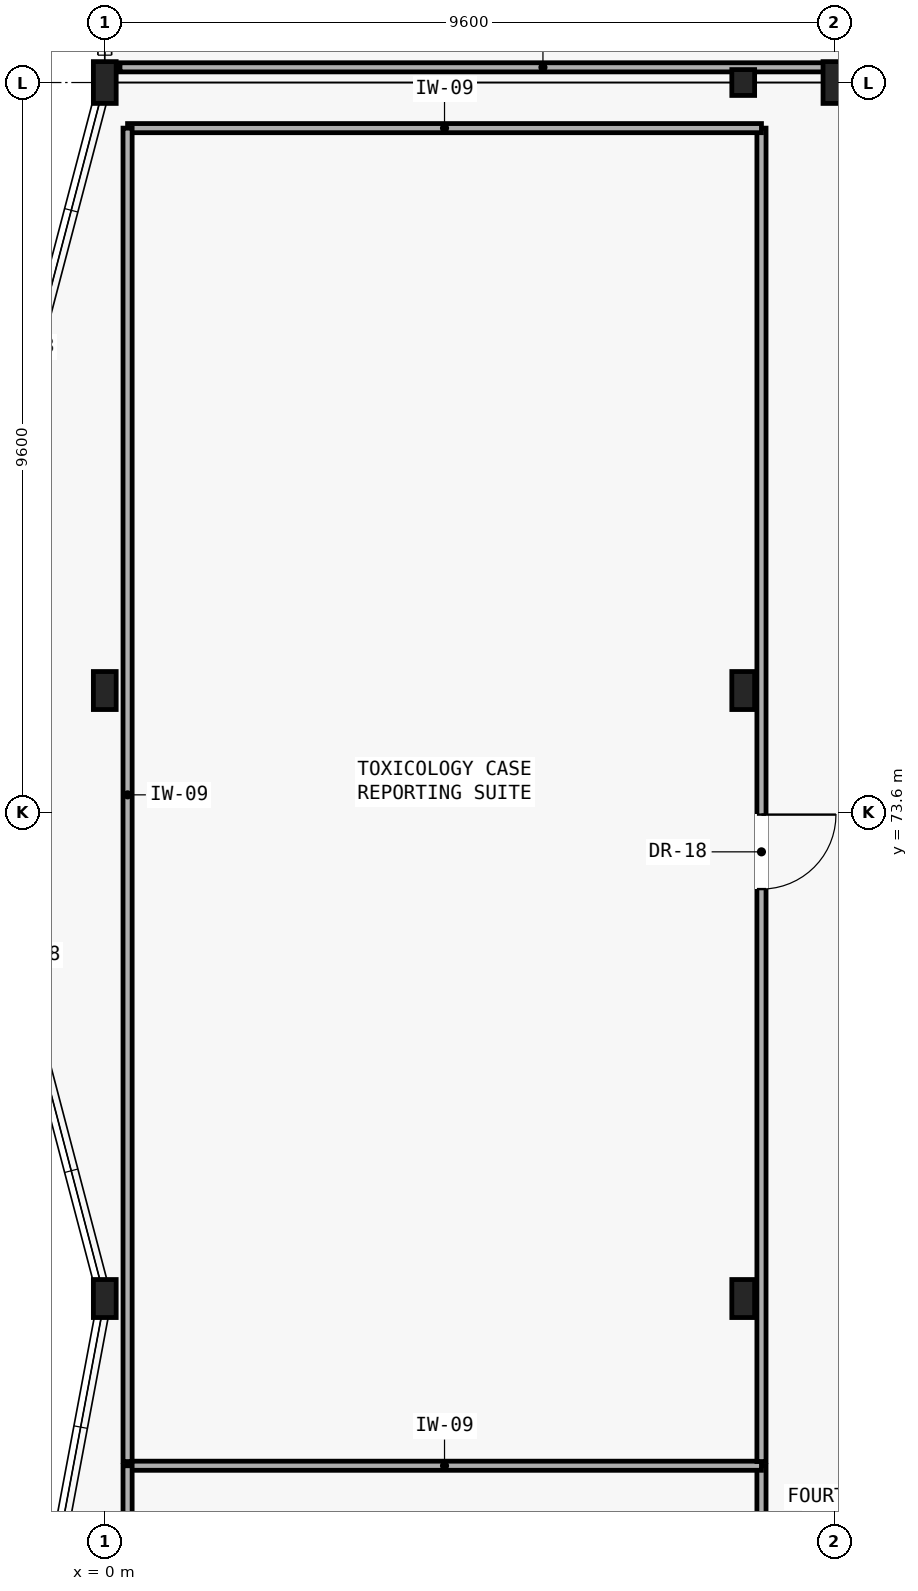
"""IFC4 building model, lengths in metres.
Left out: names, types, materials, properties, quantities, classifications, styles, units other than length and angle.
Written with IfcOpenShell. Run it as: python <this file> out.ifc"""

import sys

from ifc_helpers import new_model, si_unit, direction, frame, frame_2d, origin, origin_2d, place, context, subcontext, project, spatial, rectangle, i_section, extrude, element, fill, save


model = new_model("IFC4")
c1 = context("Model", 3, precision=1e-05, world=origin(), true_north=direction((0.0, 1.0)))
c2 = subcontext(c1, "Body", "Model", "MODEL_VIEW")
j1 = project(units=[si_unit("LENGTHUNIT", "METRE"), si_unit("PLANEANGLEUNIT", "RADIAN")], contexts=[c1])
p1 = place(None, origin())
s1 = spatial("IfcSite", under=j1, at=p1, CompositionType="ELEMENT")
p2 = place(p1, origin())
s2 = spatial("IfcBuilding", under=s1, at=p2, CompositionType="ELEMENT")
p3 = place(p2, frame((0.0, 0.0, 17.85)))
s3 = spatial("IfcBuildingStorey", under=s2, at=p3, CompositionType="ELEMENT", Elevation=17.85)
for number, where, z_axis, x_axis in (
    (1, (0.0, 83.2, 0.0), (0.0, 0.0, 1.0), (1.0, 0.0, 0.0)),
    (2, (9.6, 83.2, 0.0), (0.0, 0.0, 1.0), (1.0, 0.0, 0.0)),
):
    element("IfcColumn", number, at=place(p3, frame(where, z_axis=z_axis, x_axis=x_axis)), inside=s3, PredefinedType="COLUMN", context=c2, shape_type="SweptSolid", body=[
        extrude(i_section(OverallWidth=0.3, OverallDepth=0.55, WebThickness=0.015, FlangeThickness=0.029, FilletRadius=0.027, at=origin_2d()), origin(), (0.0, 0.0, 1.0), 4.2),
    ])
for number, where, z_axis, x_axis in (
    (3, (0.0, 67.2, 0.0), (0.0, 0.0, 1.0), (1.0, 0.0, 0.0)),
    (4, (8.4, 67.2, 0.0), (0.0, 0.0, 1.0), (1.0, 0.0, 0.0)),
    (5, (0.0, 75.2, 0.0), (0.0, 0.0, 1.0), (1.0, 0.0, 0.0)),
    (6, (8.4, 75.2, 0.0), (0.0, 0.0, 1.0), (1.0, 0.0, 0.0)),
):
    element("IfcColumn", number, at=place(p3, frame(where, z_axis=z_axis, x_axis=x_axis)), inside=s3, PredefinedType="COLUMN", context=c2, shape_type="SweptSolid", body=[
        extrude(i_section(OverallWidth=0.3, OverallDepth=0.5, WebThickness=0.014, FlangeThickness=0.028, FilletRadius=0.027, at=origin_2d()), origin(), (0.0, 0.0, 1.0), 4.2),
    ])
p4 = place(p3, frame((8.4, 83.2, 0.0), z_axis=(0.0, 0.0, 1.0), x_axis=(1.0, 0.0, 0.0)))
e7 = element("IfcColumn", 7, at=p4, inside=s3, PredefinedType="COLUMN", context=c2, shape_type="SweptSolid", body=[
    extrude(i_section(OverallWidth=0.3, OverallDepth=0.34, WebThickness=0.012, FlangeThickness=0.021, FilletRadius=0.027, at=origin_2d()), origin(), (0.0, 0.0, 1.0), 4.2),
])
p5 = place(p3, frame((0.2, 83.4, 0.0), z_axis=(0.0, 0.0, 1.0), x_axis=(1.0, 0.0, 0.0)))
e8 = element("IfcWall", 8, at=p5, inside=s3, PredefinedType="PARTITIONING", context=c2, shape_type="SweptSolid", body=[
    extrude(rectangle(XDim=15.9, YDim=0.12, at=frame_2d((7.95, 0.0))), origin(), (0.0, 0.0, 1.0), 3.165),
])
p6 = place(p3, frame((8.64, 48.25, 0.0), z_axis=(0.0, 0.0, 1.0), x_axis=(0.0, 1.0, 0.0)))
e9 = element("IfcWall", 9, at=p6, inside=s3, PredefinedType="PARTITIONING", context=c2, shape_type="SweptSolid", body=[
    extrude(rectangle(XDim=16.75, YDim=0.12, at=frame_2d((8.375, 0.0))), origin(), (0.0, 0.0, 1.0), 3.53),
])
p7 = place(p6, frame((6.865, 0.0, 0.0)))
e10 = element("IfcOpeningElement", 10, at=p7, cuts=e9, PredefinedType="OPENING", context=c2, shape_type="SweptSolid", body=[
    extrude(rectangle(XDim=1.02, YDim=2.1, at=frame_2d((0.51, 1.05))), frame((0.0, 0.07, 0.0), z_axis=(0.0, -1.0, 0.0), x_axis=(1.0, 0.0, 0.0)), (0.0, 0.0, 1.0), 0.14),
])
p8 = place(p3, frame((8.64, 65.0, 0.0), z_axis=(0.0, 0.0, 1.0), x_axis=(-1.0, 0.0, 0.0)))
e11 = element("IfcWall", 11, at=p8, inside=s3, PredefinedType="PARTITIONING", context=c2, shape_type="SweptSolid", body=[
    extrude(rectangle(XDim=8.34, YDim=0.12, at=frame_2d((4.17, 0.0))), origin(), (0.0, 0.0, 1.0), 3.99),
])
p9 = place(p3, frame((0.3, 65.0, 0.0), z_axis=(0.0, 0.0, 1.0), x_axis=(0.0, -1.0, 0.0)))
e12 = element("IfcWall", 12, at=p9, inside=s3, PredefinedType="PARTITIONING", context=c2, shape_type="SweptSolid", body=[
    extrude(rectangle(XDim=16.75, YDim=0.12, at=frame_2d((8.375, 0.0))), origin(), (0.0, 0.0, 1.0), 3.99),
])
p10 = place(p3, frame((8.64, 65.055, 0.0), z_axis=(0.0, 0.0, 1.0), x_axis=(0.0, 1.0, 0.0)))
e13 = element("IfcWall", 13, at=p10, inside=s3, PredefinedType="PARTITIONING", context=c2, shape_type="SweptSolid", body=[
    extrude(rectangle(XDim=17.545, YDim=0.12, at=frame_2d((8.772, 0.0))), origin(), (0.0, 0.0, 1.0), 3.525),
])
p11 = place(p10, frame((7.532, 0.0, 0.0)))
e14 = element("IfcOpeningElement", 14, at=p11, cuts=e13, PredefinedType="OPENING", context=c2, shape_type="SweptSolid", body=[
    extrude(rectangle(XDim=0.98, YDim=2.1, at=frame_2d((0.49, 1.05))), frame((0.0, 0.07, 0.0), z_axis=(0.0, -1.0, 0.0), x_axis=(1.0, 0.0, 0.0)), (0.0, 0.0, 1.0), 0.14),
])
p12 = place(p3, frame((8.64, 82.6, 0.0), z_axis=(0.0, 0.0, 1.0), x_axis=(-1.0, 0.0, 0.0)))
e15 = element("IfcWall", 15, at=p12, inside=s3, PredefinedType="PARTITIONING", context=c2, shape_type="SweptSolid", body=[
    extrude(rectangle(XDim=8.34, YDim=0.12, at=frame_2d((4.17, 0.0))), origin(), (0.0, 0.0, 1.0), 3.99),
])
p13 = place(p3, frame((0.3, 82.6, 0.0), z_axis=(0.0, 0.0, 1.0), x_axis=(0.0, -1.0, 0.0)))
e16 = element("IfcWall", 16, at=p13, inside=s3, PredefinedType="PARTITIONING", context=c2, shape_type="SweptSolid", body=[
    extrude(rectangle(XDim=17.545, YDim=0.12, at=frame_2d((8.772, 0.0))), origin(), (0.0, 0.0, 1.0), 3.99),
])
p14 = place(p11, frame((0.98, 0.0, 0.0), z_axis=(0.0, 0.0, 1.0), x_axis=(-1.0, 0.0, 0.0)))
e17 = element("IfcDoor", 17, at=p14, inside=s3, OperationType="SINGLE_SWING_RIGHT", PredefinedType="DOOR", context=c2, shape_type="SweptSolid", body=[
    extrude(rectangle(XDim=0.98, YDim=2.1, at=frame_2d((0.49, 1.05))), frame((0.0, 0.025, 0.0), z_axis=(0.0, -1.0, 0.0), x_axis=(1.0, 0.0, 0.0)), (0.0, 0.0, 1.0), 0.05),
])
fill(e14, e17)
save(model, sys.argv[1])
